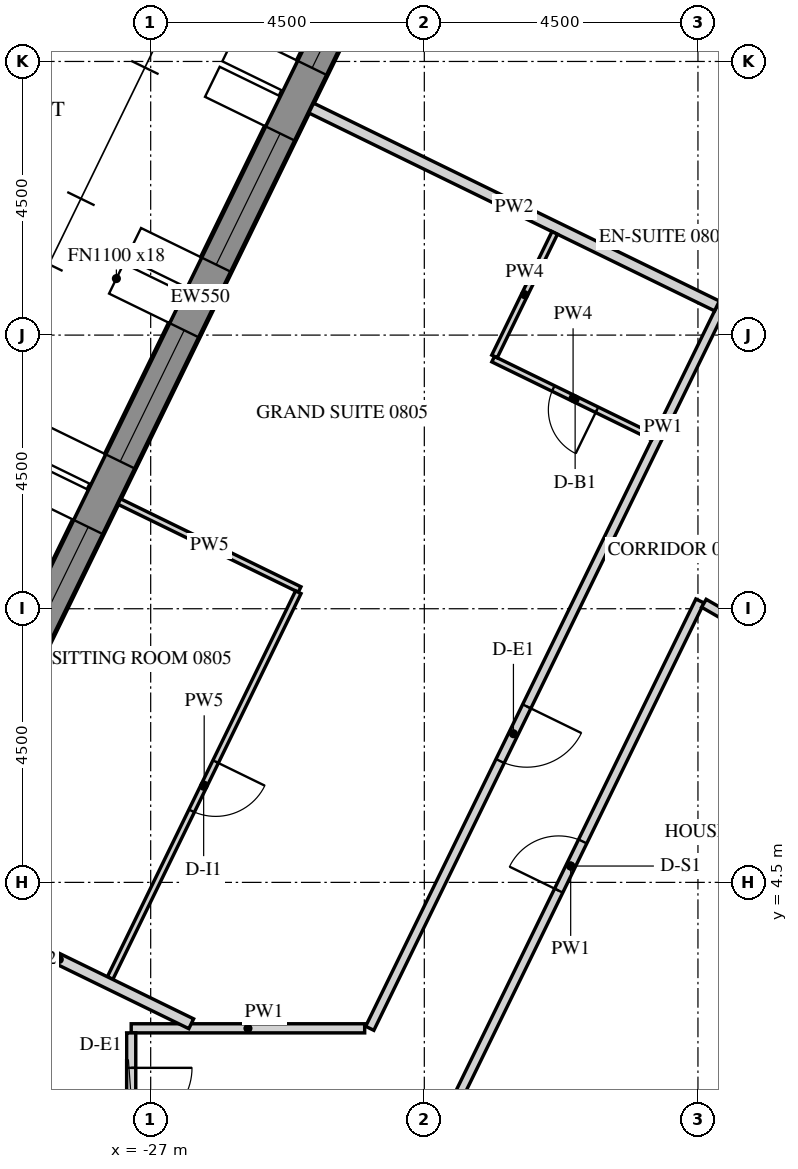
"""IFC4 building model, lengths in metres.
Left out: names, types, materials, properties, quantities, classifications, styles, units other than length and angle.
Written with IfcOpenShell. Run it as: python <this file> out.ifc"""

import sys

from ifc_helpers import new_model, si_unit, direction, frame, frame_2d, origin, place, context, subcontext, project, spatial, polyline, rectangle, outline, extrude, element, fill, save


model = new_model("IFC4")
c1 = context("Model", 3, precision=1e-05, world=origin(), true_north=direction((0.0, 1.0)))
c2 = subcontext(c1, "Body", "Model", "MODEL_VIEW")
j1 = project(units=[si_unit("LENGTHUNIT", "METRE"), si_unit("PLANEANGLEUNIT", "RADIAN")], contexts=[c1])
p1 = place(None, origin())
s1 = spatial("IfcSite", under=j1, at=p1, CompositionType="ELEMENT")
p2 = place(p1, origin())
s2 = spatial("IfcBuilding", under=s1, at=p2, CompositionType="ELEMENT")
p3 = place(p2, frame((0.0, 0.0, 111.6)))
s3 = spatial("IfcBuildingStorey", under=s2, at=p3, CompositionType="ELEMENT", Elevation=111.6)
p4 = place(p3, frame((-19.595, 27.633, -0.15), z_axis=(0.0, 0.0, 1.0), x_axis=(-0.438368285794, -0.898795441694, 0.0)))
e1 = element("IfcWall", 1, at=p4, inside=s3, PredefinedType="SOLIDWALL", context=c2, shape_type="SweptSolid", body=[
    extrude(outline(polyline([(-0.026, -0.275), (30.093, -0.275), (30.048, 0.275), (0.026, 0.275), (-0.026, -0.275)])), origin(), (0.0, 0.0, 1.0), 3.9),
])
p5 = place(p4, frame((1.236, 0.0, 1.05)))
e2 = element("IfcOpeningElement", 2, at=p5, cuts=e1, PredefinedType="OPENING", context=c2, shape_type="SweptSolid", body=[
    extrude(rectangle(XDim=2.4, YDim=2.4, at=frame_2d((1.2, 1.2))), frame((0.0, 0.285, 0.0), z_axis=(0.0, -1.0, 0.0), x_axis=(1.0, 0.0, 0.0)), (0.0, 0.0, 1.0), 0.57),
])
p6 = place(p4, frame((4.835, 0.0, 1.05)))
e3 = element("IfcOpeningElement", 3, at=p6, cuts=e1, PredefinedType="OPENING", context=c2, shape_type="SweptSolid", body=[
    extrude(rectangle(XDim=2.4, YDim=2.4, at=frame_2d((1.2, 1.2))), frame((0.0, 0.285, 0.0), z_axis=(0.0, -1.0, 0.0), x_axis=(1.0, 0.0, 0.0)), (0.0, 0.0, 1.0), 0.57),
])
p7 = place(p4, frame((8.436, 0.0, 1.05)))
e4 = element("IfcOpeningElement", 4, at=p7, cuts=e1, PredefinedType="OPENING", context=c2, shape_type="SweptSolid", body=[
    extrude(rectangle(XDim=2.4, YDim=2.4, at=frame_2d((1.2, 1.2))), frame((0.0, 0.285, 0.0), z_axis=(0.0, -1.0, 0.0), x_axis=(1.0, 0.0, 0.0)), (0.0, 0.0, 1.0), 0.57),
])
p8 = place(p4, frame((12.035, 0.0, 1.05)))
e5 = element("IfcOpeningElement", 5, at=p8, cuts=e1, PredefinedType="OPENING", context=c2, shape_type="SweptSolid", body=[
    extrude(rectangle(XDim=2.4, YDim=2.4, at=frame_2d((1.2, 1.2))), frame((0.0, 0.285, 0.0), z_axis=(0.0, -1.0, 0.0), x_axis=(1.0, 0.0, 0.0)), (0.0, 0.0, 1.0), 0.57),
])
p9 = place(p4, frame((15.635, 0.0, 1.05)))
e6 = element("IfcOpeningElement", 6, at=p9, cuts=e1, PredefinedType="OPENING", context=c2, shape_type="SweptSolid", body=[
    extrude(rectangle(XDim=2.4, YDim=2.4, at=frame_2d((1.2, 1.2))), frame((0.0, 0.285, 0.0), z_axis=(0.0, -1.0, 0.0), x_axis=(1.0, 0.0, 0.0)), (0.0, 0.0, 1.0), 0.57),
])
p10 = place(p4, frame((19.236, 0.0, 1.05)))
e7 = element("IfcOpeningElement", 7, at=p10, cuts=e1, PredefinedType="OPENING", context=c2, shape_type="SweptSolid", body=[
    extrude(rectangle(XDim=2.4, YDim=2.4, at=frame_2d((1.2, 1.2))), frame((0.0, 0.285, 0.0), z_axis=(0.0, -1.0, 0.0), x_axis=(1.0, 0.0, 0.0)), (0.0, 0.0, 1.0), 0.57),
])
p11 = place(p4, frame((22.835, 0.0, 1.05)))
e8 = element("IfcOpeningElement", 8, at=p11, cuts=e1, PredefinedType="OPENING", context=c2, shape_type="SweptSolid", body=[
    extrude(rectangle(XDim=2.4, YDim=2.4, at=frame_2d((1.2, 1.2))), frame((0.0, 0.285, 0.0), z_axis=(0.0, -1.0, 0.0), x_axis=(1.0, 0.0, 0.0)), (0.0, 0.0, 1.0), 0.57),
])
p12 = place(p4, frame((26.436, 0.0, 1.05)))
e9 = element("IfcOpeningElement", 9, at=p12, cuts=e1, PredefinedType="OPENING", context=c2, shape_type="SweptSolid", body=[
    extrude(rectangle(XDim=2.4, YDim=2.4, at=frame_2d((1.2, 1.2))), frame((0.0, 0.285, 0.0), z_axis=(0.0, -1.0, 0.0), x_axis=(1.0, 0.0, 0.0)), (0.0, 0.0, 1.0), 0.57),
])
p13 = place(p3, frame((-13.752, 21.875, 0.0), z_axis=(0.0, 0.0, 1.0), x_axis=(-0.438376846054, -0.898791266559, 0.0)))
e10 = element("IfcWall", 10, at=p13, inside=s3, PredefinedType="PARTITIONING", context=c2, shape_type="SweptSolid", body=[
    extrude(rectangle(XDim=22.002, YDim=0.15, at=frame_2d((11.001, 0.0))), origin(), (0.0, 0.0, 1.0), 2.988),
])
p14 = place(p13, frame((5.169, 0.0, 0.0)))
e11 = element("IfcOpeningElement", 11, at=p14, cuts=e10, PredefinedType="OPENING", context=c2, shape_type="SweptSolid", body=[
    extrude(rectangle(XDim=1.0, YDim=2.1, at=frame_2d((0.5, 1.05))), frame((0.0, 0.085, 0.0), z_axis=(0.0, -1.0, 0.0), x_axis=(1.0, 0.0, 0.0)), (0.0, 0.0, 1.0), 0.17),
])
p15 = place(p13, frame((16.112, 0.0, 0.0)))
e12 = element("IfcOpeningElement", 12, at=p15, cuts=e10, PredefinedType="OPENING", context=c2, shape_type="SweptSolid", body=[
    extrude(rectangle(XDim=1.0, YDim=2.1, at=frame_2d((0.5, 1.05))), frame((0.0, 0.085, 0.0), z_axis=(0.0, -1.0, 0.0), x_axis=(1.0, 0.0, 0.0)), (0.0, 0.0, 1.0), 0.17),
])
p16 = place(p3, frame((-23.481, 2.1, 0.0), z_axis=(0.0, 0.0, 1.0), x_axis=(-1.0, 0.0, 0.0)))
e13 = element("IfcWall", 13, at=p16, inside=s3, PredefinedType="PARTITIONING", context=c2, shape_type="SweptSolid", body=[
    extrude(rectangle(XDim=3.84, YDim=0.15, at=frame_2d((1.92, 0.0))), origin(), (0.0, 0.0, 1.0), 2.988),
])
p17 = place(p3, frame((-27.32, 2.025, 0.0), z_axis=(0.0, 0.0, 1.0), x_axis=(0.0, -1.0, 0.0)))
e14 = element("IfcWall", 14, at=p17, inside=s3, PredefinedType="PARTITIONING", context=c2, shape_type="SweptSolid", body=[
    extrude(rectangle(XDim=1.725, YDim=0.15, at=frame_2d((0.862, 0.0))), origin(), (0.0, 0.0, 1.0), 2.988),
])
p18 = place(p17, frame((0.575, 0.0, 0.0)))
e15 = element("IfcOpeningElement", 15, at=p18, cuts=e14, PredefinedType="OPENING", context=c2, shape_type="SweptSolid", body=[
    extrude(rectangle(XDim=1.0, YDim=2.1, at=frame_2d((0.5, 1.05))), frame((0.0, 0.085, 0.0), z_axis=(0.0, -1.0, 0.0), x_axis=(1.0, 0.0, 0.0)), (0.0, 0.0, 1.0), 0.17),
])
p19 = place(p3, frame((-22.219, 0.41, 0.0), z_axis=(0.0, 0.0, 1.0), x_axis=(0.438391891827, 0.898783927972, 0.0)))
e16 = element("IfcWall", 16, at=p19, inside=s3, PredefinedType="PARTITIONING", context=c2, shape_type="SweptSolid", body=[
    extrude(rectangle(XDim=9.699, YDim=0.15, at=frame_2d((4.85, 0.0))), origin(), (0.0, 0.0, 1.0), 2.988),
])
p20 = place(p19, frame((4.4, 0.0, 0.0)))
e17 = element("IfcOpeningElement", 17, at=p20, cuts=e16, PredefinedType="OPENING", context=c2, shape_type="SweptSolid", body=[
    extrude(rectangle(XDim=0.9, YDim=2.1, at=frame_2d((0.45, 1.05))), frame((0.0, 0.085, 0.0), z_axis=(0.0, -1.0, 0.0), x_axis=(1.0, 0.0, 0.0)), (0.0, 0.0, 1.0), 0.17),
])
p21 = place(p3, frame((-17.902, 9.09, 0.0), z_axis=(0.0, 0.0, 1.0), x_axis=(0.866036368755, -0.499981007633, 0.0)))
e18 = element("IfcWall", 18, at=p21, inside=s3, PredefinedType="PARTITIONING", context=c2, shape_type="SweptSolid", body=[
    extrude(rectangle(XDim=6.049, YDim=0.15, at=frame_2d((3.024, 0.0))), origin(), (0.0, 0.0, 1.0), 2.988),
])
p22 = place(p3, frame((-24.36, 17.234, 0.0), z_axis=(0.0, 0.0, 1.0), x_axis=(0.898796252669, -0.438366623032, 0.0)))
e19 = element("IfcWall", 19, at=p22, inside=s3, PredefinedType="PARTITIONING", context=c2, shape_type="SweptSolid", body=[
    extrude(rectangle(XDim=7.425, YDim=0.18, at=frame_2d((3.712, 0.0))), origin(), (0.0, 0.0, 1.0), 2.988),
])
p23 = place(p3, frame((-18.739, 11.822, 0.0), z_axis=(0.0, 0.0, 1.0), x_axis=(-0.898790906006, 0.438377585285, 0.0)))
e20 = element("IfcWall", 20, at=p23, inside=s3, PredefinedType="PARTITIONING", context=c2, shape_type="SweptSolid", body=[
    extrude(rectangle(XDim=2.925, YDim=0.1, at=frame_2d((1.462, 0.0))), origin(), (0.0, 0.0, 1.0), 2.988),
])
p24 = place(p23, frame((1.025, 0.0, 0.0)))
e21 = element("IfcOpeningElement", 21, at=p24, cuts=e20, PredefinedType="OPENING", context=c2, shape_type="SweptSolid", body=[
    extrude(rectangle(XDim=0.8, YDim=2.1, at=frame_2d((0.4, 1.05))), frame((0.0, 0.06, 0.0), z_axis=(0.0, -1.0, 0.0), x_axis=(1.0, 0.0, 0.0)), (0.0, 0.0, 1.0), 0.12),
])
p25 = place(p3, frame((-21.346, 13.149, 0.0), z_axis=(0.0, 0.0, 1.0), x_axis=(0.438376807268, 0.898791285477, 0.0)))
e22 = element("IfcWall", 22, at=p25, inside=s3, PredefinedType="PARTITIONING", context=c2, shape_type="SweptSolid", body=[
    extrude(rectangle(XDim=2.26, YDim=0.1, at=frame_2d((1.13, 0.0))), origin(), (0.0, 0.0, 1.0), 2.988),
])
p26 = place(p3, frame((-27.517, 10.763, 0.0), z_axis=(0.0, 0.0, 1.0), x_axis=(0.898764179314, -0.43843237789, 0.0)))
e23 = element("IfcWall", 23, at=p26, inside=s3, PredefinedType="PARTITIONING", context=c2, shape_type="SweptSolid", body=[
    extrude(rectangle(XDim=3.3, YDim=0.1, at=frame_2d((1.65, 0.0))), origin(), (0.0, 0.0, 1.0), 2.988),
])
p27 = place(p3, frame((-24.573, 9.271, 0.0), z_axis=(0.0, 0.0, 1.0), x_axis=(-0.438380708798, -0.898789382533, 0.0)))
e24 = element("IfcWall", 24, at=p27, inside=s3, PredefinedType="PARTITIONING", context=c2, shape_type="SweptSolid", body=[
    extrude(rectangle(XDim=7.06, YDim=0.1, at=frame_2d((3.53, 0.0))), origin(), (0.0, 0.0, 1.0), 2.988),
])
p28 = place(p27, frame((3.1, 0.0, 0.0)))
e25 = element("IfcOpeningElement", 25, at=p28, cuts=e24, PredefinedType="OPENING", context=c2, shape_type="SweptSolid", body=[
    extrude(rectangle(XDim=0.9, YDim=2.1, at=frame_2d((0.45, 1.05))), frame((0.0, 0.06, 0.0), z_axis=(0.0, -1.0, 0.0), x_axis=(1.0, 0.0, 0.0)), (0.0, 0.0, 1.0), 0.12),
])
p29 = place(p3, frame((-30.673, 4.292, 0.0), z_axis=(0.0, 0.0, 1.0), x_axis=(0.898812662672, -0.438332975512, 0.0)))
e26 = element("IfcWall", 26, at=p29, inside=s3, PredefinedType="PARTITIONING", context=c2, shape_type="SweptSolid", body=[
    extrude(rectangle(XDim=4.828, YDim=0.18, at=frame_2d((2.414, 0.0))), origin(), (0.0, 0.0, 1.0), 2.988),
])
p30 = place(p7, frame((0.0, 0.205, 0.0)))
e27 = element("IfcWindow", 27, at=p30, inside=s3, PartitioningType="DOUBLE_PANEL_VERTICAL", PredefinedType="WINDOW", context=c2, shape_type="SweptSolid", body=[
    extrude(rectangle(XDim=2.4, YDim=2.4, at=frame_2d((1.2, 1.2))), frame((0.0, 0.03, 0.0), z_axis=(0.0, -1.0, 0.0), x_axis=(1.0, 0.0, 0.0)), (0.0, 0.0, 1.0), 0.06),
])
fill(e4, e27)
p31 = place(p8, frame((0.0, 0.205, 0.0)))
e28 = element("IfcWindow", 28, at=p31, inside=s3, PartitioningType="DOUBLE_PANEL_VERTICAL", PredefinedType="WINDOW", context=c2, shape_type="SweptSolid", body=[
    extrude(rectangle(XDim=2.4, YDim=2.4, at=frame_2d((1.2, 1.2))), frame((0.0, 0.03, 0.0), z_axis=(0.0, -1.0, 0.0), x_axis=(1.0, 0.0, 0.0)), (0.0, 0.0, 1.0), 0.06),
])
fill(e5, e28)
p32 = place(p9, frame((0.0, 0.205, 0.0)))
e29 = element("IfcWindow", 29, at=p32, inside=s3, PartitioningType="DOUBLE_PANEL_VERTICAL", PredefinedType="WINDOW", context=c2, shape_type="SweptSolid", body=[
    extrude(rectangle(XDim=2.4, YDim=2.4, at=frame_2d((1.2, 1.2))), frame((0.0, 0.03, 0.0), z_axis=(0.0, -1.0, 0.0), x_axis=(1.0, 0.0, 0.0)), (0.0, 0.0, 1.0), 0.06),
])
fill(e6, e29)
p33 = place(p10, frame((0.0, 0.205, 0.0)))
e30 = element("IfcWindow", 30, at=p33, inside=s3, PartitioningType="DOUBLE_PANEL_VERTICAL", PredefinedType="WINDOW", context=c2, shape_type="SweptSolid", body=[
    extrude(rectangle(XDim=2.4, YDim=2.4, at=frame_2d((1.2, 1.2))), frame((0.0, 0.03, 0.0), z_axis=(0.0, -1.0, 0.0), x_axis=(1.0, 0.0, 0.0)), (0.0, 0.0, 1.0), 0.06),
])
fill(e7, e30)
p34 = place(p15, origin())
e31 = element("IfcDoor", 31, at=p34, inside=s3, OperationType="SINGLE_SWING_LEFT", PredefinedType="DOOR", context=c2, shape_type="SweptSolid", body=[
    extrude(rectangle(XDim=1.0, YDim=2.1, at=frame_2d((0.5, 1.05))), frame((0.0, 0.025, 0.0), z_axis=(0.0, -1.0, 0.0), x_axis=(1.0, 0.0, 0.0)), (0.0, 0.0, 1.0), 0.05),
])
fill(e12, e31)
p35 = place(p24, origin())
e32 = element("IfcDoor", 32, at=p35, inside=s3, OperationType="SINGLE_SWING_RIGHT", PredefinedType="DOOR", context=c2, shape_type="SweptSolid", body=[
    extrude(rectangle(XDim=0.8, YDim=2.1, at=frame_2d((0.4, 1.05))), frame((0.0, 0.025, 0.0), z_axis=(0.0, -1.0, 0.0), x_axis=(1.0, 0.0, 0.0)), (0.0, 0.0, 1.0), 0.05),
])
fill(e21, e32)
p36 = place(p28, origin())
e33 = element("IfcDoor", 33, at=p36, inside=s3, OperationType="SINGLE_SWING_RIGHT", PredefinedType="DOOR", context=c2, shape_type="SweptSolid", body=[
    extrude(rectangle(XDim=0.9, YDim=2.1, at=frame_2d((0.45, 1.05))), frame((0.0, 0.025, 0.0), z_axis=(0.0, -1.0, 0.0), x_axis=(1.0, 0.0, 0.0)), (0.0, 0.0, 1.0), 0.05),
])
fill(e25, e33)
p37 = place(p18, origin())
e34 = element("IfcDoor", 34, at=p37, inside=s3, OperationType="SINGLE_SWING_LEFT", PredefinedType="DOOR", context=c2, shape_type="SweptSolid", body=[
    extrude(rectangle(XDim=1.0, YDim=2.1, at=frame_2d((0.5, 1.05))), frame((0.0, 0.025, 0.0), z_axis=(0.0, -1.0, 0.0), x_axis=(1.0, 0.0, 0.0)), (0.0, 0.0, 1.0), 0.05),
])
fill(e15, e34)
p38 = place(p20, origin())
e35 = element("IfcDoor", 35, at=p38, inside=s3, OperationType="SINGLE_SWING_LEFT", PredefinedType="DOOR", context=c2, shape_type="SweptSolid", body=[
    extrude(rectangle(XDim=0.9, YDim=2.1, at=frame_2d((0.45, 1.05))), frame((0.0, 0.025, 0.0), z_axis=(0.0, -1.0, 0.0), x_axis=(1.0, 0.0, 0.0)), (0.0, 0.0, 1.0), 0.05),
])
fill(e17, e35)
save(model, sys.argv[1])
